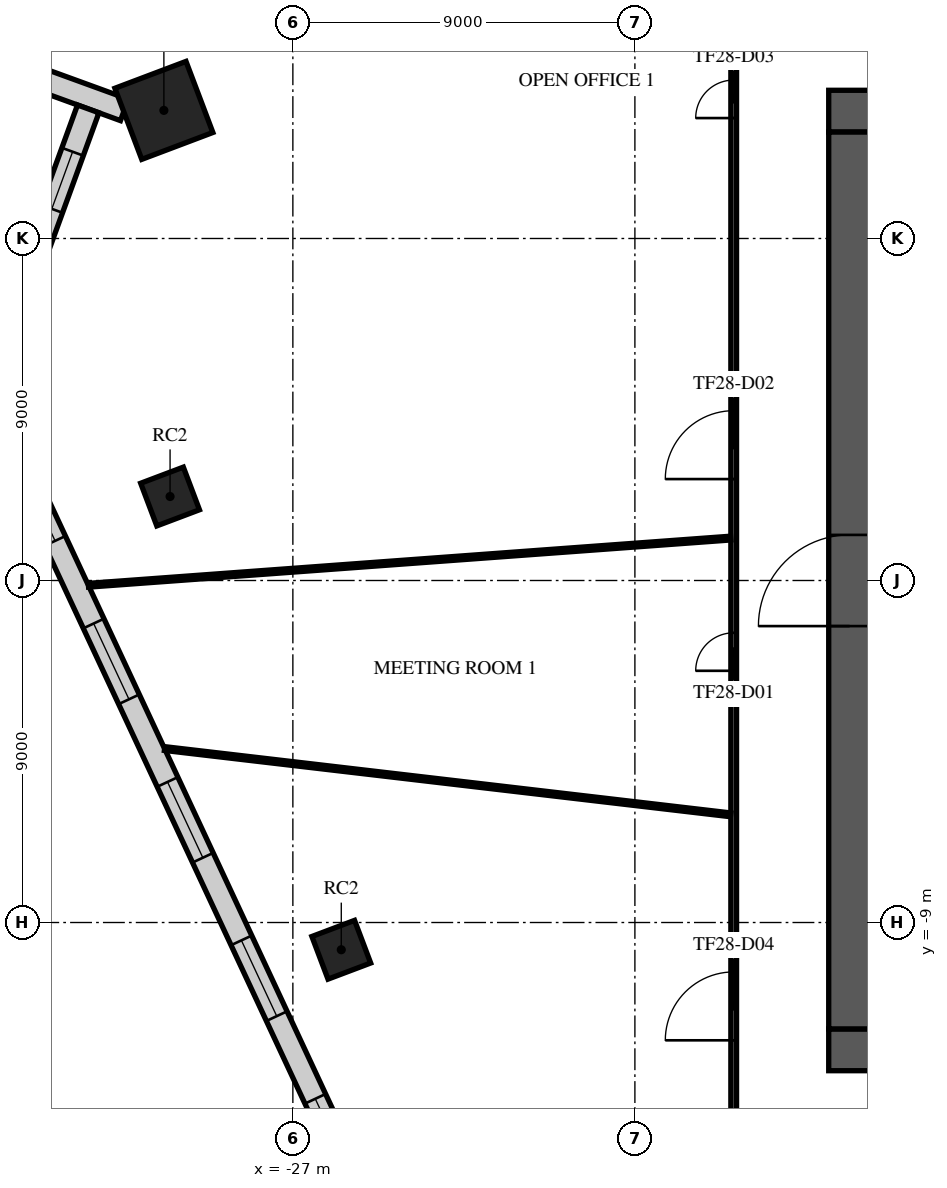
"""IFC4 building model, lengths in metres.
Left out: names, types, materials, properties, quantities, classifications, styles, units other than length and angle.
Written with IfcOpenShell. Run it as: python <this file> out.ifc"""

import sys

from ifc_helpers import new_model, si_unit, direction, frame, frame_2d, origin, origin_2d, place, context, subcontext, project, spatial, rectangle, extrude, element, fill, save


model = new_model("IFC4")
c1 = context("Model", 3, precision=1e-05, world=origin(), true_north=direction((0.0, 1.0)))
c2 = subcontext(c1, "Body", "Model", "MODEL_VIEW")
j1 = project(units=[si_unit("LENGTHUNIT", "METRE"), si_unit("PLANEANGLEUNIT", "RADIAN")], contexts=[c1])
p1 = place(None, origin())
s1 = spatial("IfcSite", under=j1, at=p1, CompositionType="ELEMENT")
p2 = place(p1, origin())
s2 = spatial("IfcBuilding", under=s1, at=p2, CompositionType="ELEMENT")
p3 = place(p2, frame((0.0, 0.0, 122.1)))
s3 = spatial("IfcBuildingStorey", under=s2, at=p3, CompositionType="ELEMENT", Elevation=122.1)
p4 = place(p3, frame((-30.394, 12.371, 0.0), z_axis=(0.0, 0.0, 1.0), x_axis=(0.935491525991, 0.353349125935, 0.0)))
e1 = element("IfcColumn", 1, at=p4, inside=s3, PredefinedType="COLUMN", context=c2, shape_type="SweptSolid", body=[
    extrude(rectangle(XDim=2.0, YDim=2.0, at=origin_2d()), origin(), (0.0, 0.0, 1.0), 4.0),
])
for number, where, z_axis, x_axis in (
    (2, (-30.231, 2.21, 0.0), (0.0, 0.0, 1.0), (0.935, 0.353, 0.0)),
    (3, (-25.726, -9.717, 0.0), (0.0, 0.0, 1.0), (0.935, 0.353, 0.0)),
):
    element("IfcColumn", number, at=place(p3, frame(where, z_axis=z_axis, x_axis=x_axis)), inside=s3, PredefinedType="COLUMN", context=c2, shape_type="SweptSolid", body=[
        extrude(rectangle(XDim=1.2, YDim=1.2, at=origin_2d()), origin(), (0.0, 0.0, 1.0), 4.0),
    ])
p5 = place(p3, frame((-12.9, 12.35, 0.0), z_axis=(0.0, 0.0, 1.0), x_axis=(1.0, 0.0, 0.0)))
e4 = element("IfcWall", 4, at=p5, inside=s3, PredefinedType="SHEAR", context=c2, shape_type="SweptSolid", body=[
    extrude(rectangle(XDim=25.8, YDim=1.1, at=frame_2d((12.9, 0.0))), origin(), (0.0, 0.0, 1.0), 3.58),
])
p6 = place(p5, frame((11.7, 0.0, 0.0)))
e5 = element("IfcOpeningElement", 5, at=p6, cuts=e4, PredefinedType="OPENING", context=c2, shape_type="SweptSolid", body=[
    extrude(rectangle(XDim=2.4, YDim=2.4, at=frame_2d((1.2, 1.2))), frame((0.0, 0.56, 0.0), z_axis=(0.0, -1.0, 0.0), x_axis=(1.0, 0.0, 0.0)), (0.0, 0.0, 1.0), 1.12),
])
p7 = place(p5, frame((22.525, 0.0, 0.0)))
e6 = element("IfcOpeningElement", 6, at=p7, cuts=e4, PredefinedType="OPENING", context=c2, shape_type="SweptSolid", body=[
    extrude(rectangle(XDim=1.2, YDim=2.1, at=frame_2d((0.6, 1.05))), frame((0.0, 0.56, 0.0), z_axis=(0.0, -1.0, 0.0), x_axis=(1.0, 0.0, 0.0)), (0.0, 0.0, 1.0), 1.12),
])
p8 = place(p5, frame((1.5, 0.0, 0.0)))
e7 = element("IfcOpeningElement", 7, at=p8, cuts=e4, PredefinedType="OPENING", context=c2, shape_type="SweptSolid", body=[
    extrude(rectangle(XDim=1.0, YDim=2.1, at=frame_2d((0.5, 1.05))), frame((0.0, 0.56, 0.0), z_axis=(0.0, -1.0, 0.0), x_axis=(1.0, 0.0, 0.0)), (0.0, 0.0, 1.0), 1.12),
])
p9 = place(p3, frame((-12.9, -12.35, 0.0), z_axis=(0.0, 0.0, 1.0), x_axis=(1.0, 0.0, 0.0)))
e8 = element("IfcWall", 8, at=p9, inside=s3, PredefinedType="SHEAR", context=c2, shape_type="SweptSolid", body=[
    extrude(rectangle(XDim=25.8, YDim=1.1, at=frame_2d((12.9, 0.0))), origin(), (0.0, 0.0, 1.0), 3.58),
])
p10 = place(p9, frame((7.8, 0.0, 0.0)))
e9 = element("IfcOpeningElement", 9, at=p10, cuts=e8, PredefinedType="OPENING", context=c2, shape_type="SweptSolid", body=[
    extrude(rectangle(XDim=2.0, YDim=2.1, at=frame_2d((1.0, 1.05))), frame((0.0, 0.56, 0.0), z_axis=(0.0, -1.0, 0.0), x_axis=(1.0, 0.0, 0.0)), (0.0, 0.0, 1.0), 1.12),
])
p11 = place(p9, frame((17.925, 0.0, 0.0)))
e10 = element("IfcOpeningElement", 10, at=p11, cuts=e8, PredefinedType="OPENING", context=c2, shape_type="SweptSolid", body=[
    extrude(rectangle(XDim=1.2, YDim=2.1, at=frame_2d((0.6, 1.05))), frame((0.0, 0.56, 0.0), z_axis=(0.0, -1.0, 0.0), x_axis=(1.0, 0.0, 0.0)), (0.0, 0.0, 1.0), 1.12),
])
p12 = place(p9, frame((2.075, 0.0, 0.0)))
e11 = element("IfcOpeningElement", 11, at=p12, cuts=e8, PredefinedType="OPENING", context=c2, shape_type="SweptSolid", body=[
    extrude(rectangle(XDim=1.2, YDim=2.1, at=frame_2d((0.6, 1.05))), frame((0.0, 0.56, 0.0), z_axis=(0.0, -1.0, 0.0), x_axis=(1.0, 0.0, 0.0)), (0.0, 0.0, 1.0), 1.12),
])
p13 = place(p9, frame((22.525, 0.0, 0.0)))
e12 = element("IfcOpeningElement", 12, at=p13, cuts=e8, PredefinedType="OPENING", context=c2, shape_type="SweptSolid", body=[
    extrude(rectangle(XDim=1.2, YDim=2.1, at=frame_2d((0.6, 1.05))), frame((0.0, 0.56, 0.0), z_axis=(0.0, -1.0, 0.0), x_axis=(1.0, 0.0, 0.0)), (0.0, 0.0, 1.0), 1.12),
])
p14 = place(p3, frame((-12.35, -11.8, 0.0), z_axis=(0.0, 0.0, 1.0), x_axis=(0.0, 1.0, 0.0)))
e13 = element("IfcWall", 13, at=p14, inside=s3, PredefinedType="SHEAR", context=c2, shape_type="SweptSolid", body=[
    extrude(rectangle(XDim=23.6, YDim=1.1, at=frame_2d((11.8, 0.0))), origin(), (0.0, 0.0, 1.0), 3.58),
])
p15 = place(p14, frame((10.6, 0.0, 0.0)))
e14 = element("IfcOpeningElement", 14, at=p15, cuts=e13, PredefinedType="OPENING", context=c2, shape_type="SweptSolid", body=[
    extrude(rectangle(XDim=2.4, YDim=2.4, at=frame_2d((1.2, 1.2))), frame((0.0, 0.56, 0.0), z_axis=(0.0, -1.0, 0.0), x_axis=(1.0, 0.0, 0.0)), (0.0, 0.0, 1.0), 1.12),
])
p16 = place(p3, frame((-34.35, 13.445, 0.0), z_axis=(0.0, 0.0, 1.0), x_axis=(0.939708408288, -0.341976764406, 0.0)))
e15 = element("IfcWall", 15, at=p16, inside=s3, PredefinedType="STANDARD", context=c2, shape_type="SweptSolid", body=[
    extrude(rectangle(XDim=3.103, YDim=0.6, at=frame_2d((1.552, 0.0))), origin(), (0.0, 0.0, 1.0), 3.58),
])
p17 = place(p3, frame((-32.385, 12.411, 0.0), z_axis=(0.0, 0.0, 1.0), x_axis=(-0.342037080957, -0.939686455819, 0.0)))
e16 = element("IfcWall", 16, at=p17, inside=s3, PredefinedType="STANDARD", context=c2, shape_type="SweptSolid", body=[
    extrude(rectangle(XDim=4.0, YDim=0.6, at=frame_2d((2.0, 0.0))), origin(), (0.0, 0.0, 1.0), 3.58),
])
p18 = place(p17, frame((1.2, 0.0, 0.9)))
e17 = element("IfcOpeningElement", 17, at=p18, cuts=e16, PredefinedType="OPENING", context=c2, shape_type="SweptSolid", body=[
    extrude(rectangle(XDim=1.6, YDim=2.1, at=frame_2d((0.8, 1.05))), frame((0.0, 0.31, 0.0), z_axis=(0.0, -1.0, 0.0), x_axis=(1.0, 0.0, 0.0)), (0.0, 0.0, 1.0), 0.62),
])
p19 = place(p3, frame((-36.585, 8.181, 0.0), z_axis=(0.0, 0.0, 1.0), x_axis=(0.422619608855, -0.906307158866, 0.0)))
e18 = element("IfcWall", 18, at=p19, inside=s3, PredefinedType="STANDARD", context=c2, shape_type="SweptSolid", body=[
    extrude(rectangle(XDim=45.751, YDim=0.6, at=frame_2d((22.876, 0.0))), origin(), (0.0, 0.0, 1.0), 3.58),
])
p20 = place(p19, frame((1.138, 0.0, 0.9)))
e19 = element("IfcOpeningElement", 19, at=p20, cuts=e18, PredefinedType="OPENING", context=c2, shape_type="SweptSolid", body=[
    extrude(rectangle(XDim=2.2, YDim=2.1, at=frame_2d((1.1, 1.05))), frame((0.0, 0.31, 0.0), z_axis=(0.0, -1.0, 0.0), x_axis=(1.0, 0.0, 0.0)), (0.0, 0.0, 1.0), 0.62),
])
p21 = place(p19, frame((5.676, 0.0, 0.9)))
e20 = element("IfcOpeningElement", 20, at=p21, cuts=e18, PredefinedType="OPENING", context=c2, shape_type="SweptSolid", body=[
    extrude(rectangle(XDim=2.2, YDim=2.1, at=frame_2d((1.1, 1.05))), frame((0.0, 0.31, 0.0), z_axis=(0.0, -1.0, 0.0), x_axis=(1.0, 0.0, 0.0)), (0.0, 0.0, 1.0), 0.62),
])
p22 = place(p19, frame((10.276, 0.0, 0.9)))
e21 = element("IfcOpeningElement", 21, at=p22, cuts=e18, PredefinedType="OPENING", context=c2, shape_type="SweptSolid", body=[
    extrude(rectangle(XDim=2.2, YDim=2.1, at=frame_2d((1.1, 1.05))), frame((0.0, 0.31, 0.0), z_axis=(0.0, -1.0, 0.0), x_axis=(1.0, 0.0, 0.0)), (0.0, 0.0, 1.0), 0.62),
])
p23 = place(p19, frame((14.876, 0.0, 0.9)))
e22 = element("IfcOpeningElement", 22, at=p23, cuts=e18, PredefinedType="OPENING", context=c2, shape_type="SweptSolid", body=[
    extrude(rectangle(XDim=2.2, YDim=2.1, at=frame_2d((1.1, 1.05))), frame((0.0, 0.31, 0.0), z_axis=(0.0, -1.0, 0.0), x_axis=(1.0, 0.0, 0.0)), (0.0, 0.0, 1.0), 0.62),
])
p24 = place(p19, frame((19.476, 0.0, 0.9)))
e23 = element("IfcOpeningElement", 23, at=p24, cuts=e18, PredefinedType="OPENING", context=c2, shape_type="SweptSolid", body=[
    extrude(rectangle(XDim=2.2, YDim=2.1, at=frame_2d((1.1, 1.05))), frame((0.0, 0.31, 0.0), z_axis=(0.0, -1.0, 0.0), x_axis=(1.0, 0.0, 0.0)), (0.0, 0.0, 1.0), 0.62),
])
p25 = place(p19, frame((24.076, 0.0, 0.9)))
e24 = element("IfcOpeningElement", 24, at=p25, cuts=e18, PredefinedType="OPENING", context=c2, shape_type="SweptSolid", body=[
    extrude(rectangle(XDim=2.2, YDim=2.1, at=frame_2d((1.1, 1.05))), frame((0.0, 0.31, 0.0), z_axis=(0.0, -1.0, 0.0), x_axis=(1.0, 0.0, 0.0)), (0.0, 0.0, 1.0), 0.62),
])
p26 = place(p19, frame((28.676, 0.0, 0.9)))
e25 = element("IfcOpeningElement", 25, at=p26, cuts=e18, PredefinedType="OPENING", context=c2, shape_type="SweptSolid", body=[
    extrude(rectangle(XDim=2.2, YDim=2.1, at=frame_2d((1.1, 1.05))), frame((0.0, 0.31, 0.0), z_axis=(0.0, -1.0, 0.0), x_axis=(1.0, 0.0, 0.0)), (0.0, 0.0, 1.0), 0.62),
])
p27 = place(p19, frame((37.876, 0.0, 0.9)))
e26 = element("IfcOpeningElement", 26, at=p27, cuts=e18, PredefinedType="OPENING", context=c2, shape_type="SweptSolid", body=[
    extrude(rectangle(XDim=2.2, YDim=2.1, at=frame_2d((1.1, 1.05))), frame((0.0, 0.31, 0.0), z_axis=(0.0, -1.0, 0.0), x_axis=(1.0, 0.0, 0.0)), (0.0, 0.0, 1.0), 0.62),
])
p28 = place(p19, frame((42.414, 0.0, 0.9)))
e27 = element("IfcOpeningElement", 27, at=p28, cuts=e18, PredefinedType="OPENING", context=c2, shape_type="SweptSolid", body=[
    extrude(rectangle(XDim=2.2, YDim=2.1, at=frame_2d((1.1, 1.05))), frame((0.0, 0.31, 0.0), z_axis=(0.0, -1.0, 0.0), x_axis=(1.0, 0.0, 0.0)), (0.0, 0.0, 1.0), 0.62),
])
p29 = place(p3, frame((-15.4, -15.4, 0.0), z_axis=(0.0, 0.0, 1.0), x_axis=(0.0, 1.0, 0.0)))
e28 = element("IfcWall", 28, at=p29, inside=s3, PredefinedType="PARTITIONING", context=c2, shape_type="SweptSolid", body=[
    extrude(rectangle(XDim=30.8, YDim=0.15, at=frame_2d((15.4, 0.0))), origin(), (0.0, 0.0, 1.0), 3.08),
])
p30 = place(p29, frame((13.024, 0.0, 0.0)))
e29 = element("IfcOpeningElement", 29, at=p30, cuts=e28, PredefinedType="OPENING", context=c2, shape_type="SweptSolid", body=[
    extrude(rectangle(XDim=1.0, YDim=2.1, at=frame_2d((0.5, 1.05))), frame((0.0, 0.085, 0.0), z_axis=(0.0, -1.0, 0.0), x_axis=(1.0, 0.0, 0.0)), (0.0, 0.0, 1.0), 0.17),
])
p31 = place(p29, frame((18.069, 0.0, 0.0)))
e30 = element("IfcOpeningElement", 30, at=p31, cuts=e28, PredefinedType="OPENING", context=c2, shape_type="SweptSolid", body=[
    extrude(rectangle(XDim=1.8, YDim=2.1, at=frame_2d((0.9, 1.05))), frame((0.0, 0.085, 0.0), z_axis=(0.0, -1.0, 0.0), x_axis=(1.0, 0.0, 0.0)), (0.0, 0.0, 1.0), 0.17),
])
p32 = place(p29, frame((27.569, 0.0, 0.0)))
e31 = element("IfcOpeningElement", 31, at=p32, cuts=e28, PredefinedType="OPENING", context=c2, shape_type="SweptSolid", body=[
    extrude(rectangle(XDim=1.0, YDim=2.1, at=frame_2d((0.5, 1.05))), frame((0.0, 0.085, 0.0), z_axis=(0.0, -1.0, 0.0), x_axis=(1.0, 0.0, 0.0)), (0.0, 0.0, 1.0), 0.17),
])
p33 = place(p29, frame((3.3, 0.0, 0.0)))
e32 = element("IfcOpeningElement", 32, at=p33, cuts=e28, PredefinedType="OPENING", context=c2, shape_type="SweptSolid", body=[
    extrude(rectangle(XDim=1.8, YDim=2.1, at=frame_2d((0.9, 1.05))), frame((0.0, 0.085, 0.0), z_axis=(0.0, -1.0, 0.0), x_axis=(1.0, 0.0, 0.0)), (0.0, 0.0, 1.0), 0.17),
])
p34 = place(p3, frame((-32.379, -0.125, 0.0), z_axis=(0.0, 0.0, 1.0), x_axis=(0.997314918509, 0.073232187723, 0.0)))
e33 = element("IfcWall", 33, at=p34, inside=s3, PredefinedType="PARTITIONING", context=c2, shape_type="SweptSolid", body=[
    extrude(rectangle(XDim=16.946, YDim=0.1, at=frame_2d((8.473, 0.0))), origin(), (0.0, 0.0, 1.0), 2.83),
])
p35 = place(p3, frame((-30.375, -4.422, 0.0), z_axis=(0.0, 0.0, 1.0), x_axis=(0.993213359121, -0.116306591663, 0.0)))
e34 = element("IfcWall", 34, at=p35, inside=s3, PredefinedType="PARTITIONING", context=c2, shape_type="SweptSolid", body=[
    extrude(rectangle(XDim=14.996, YDim=0.1, at=frame_2d((7.498, 0.0))), origin(), (0.0, 0.0, 1.0), 2.83),
])
p36 = place(p15, origin())
e35 = element("IfcDoor", 35, at=p36, inside=s3, OperationType="SINGLE_SWING_LEFT", PredefinedType="DOOR", context=c2, shape_type="SweptSolid", body=[
    extrude(rectangle(XDim=2.4, YDim=2.4, at=frame_2d((1.2, 1.2))), frame((0.0, 0.025, 0.0), z_axis=(0.0, -1.0, 0.0), x_axis=(1.0, 0.0, 0.0)), (0.0, 0.0, 1.0), 0.05),
])
fill(e14, e35)
p37 = place(p18, origin())
e36 = element("IfcWindow", 36, at=p37, inside=s3, PartitioningType="SINGLE_PANEL", PredefinedType="WINDOW", context=c2, shape_type="SweptSolid", body=[
    extrude(rectangle(XDim=1.6, YDim=2.1, at=frame_2d((0.8, 1.05))), frame((0.0, 0.03, 0.0), z_axis=(0.0, -1.0, 0.0), x_axis=(1.0, 0.0, 0.0)), (0.0, 0.0, 1.0), 0.06),
])
fill(e17, e36)
p38 = place(p21, origin())
e37 = element("IfcWindow", 37, at=p38, inside=s3, PartitioningType="SINGLE_PANEL", PredefinedType="WINDOW", context=c2, shape_type="SweptSolid", body=[
    extrude(rectangle(XDim=2.2, YDim=2.1, at=frame_2d((1.1, 1.05))), frame((0.0, 0.03, 0.0), z_axis=(0.0, -1.0, 0.0), x_axis=(1.0, 0.0, 0.0)), (0.0, 0.0, 1.0), 0.06),
])
fill(e20, e37)
p39 = place(p22, origin())
e38 = element("IfcWindow", 38, at=p39, inside=s3, PartitioningType="SINGLE_PANEL", PredefinedType="WINDOW", context=c2, shape_type="SweptSolid", body=[
    extrude(rectangle(XDim=2.2, YDim=2.1, at=frame_2d((1.1, 1.05))), frame((0.0, 0.03, 0.0), z_axis=(0.0, -1.0, 0.0), x_axis=(1.0, 0.0, 0.0)), (0.0, 0.0, 1.0), 0.06),
])
fill(e21, e38)
p40 = place(p23, origin())
e39 = element("IfcWindow", 39, at=p40, inside=s3, PartitioningType="SINGLE_PANEL", PredefinedType="WINDOW", context=c2, shape_type="SweptSolid", body=[
    extrude(rectangle(XDim=2.2, YDim=2.1, at=frame_2d((1.1, 1.05))), frame((0.0, 0.03, 0.0), z_axis=(0.0, -1.0, 0.0), x_axis=(1.0, 0.0, 0.0)), (0.0, 0.0, 1.0), 0.06),
])
fill(e22, e39)
p41 = place(p24, origin())
e40 = element("IfcWindow", 40, at=p41, inside=s3, PartitioningType="SINGLE_PANEL", PredefinedType="WINDOW", context=c2, shape_type="SweptSolid", body=[
    extrude(rectangle(XDim=2.2, YDim=2.1, at=frame_2d((1.1, 1.05))), frame((0.0, 0.03, 0.0), z_axis=(0.0, -1.0, 0.0), x_axis=(1.0, 0.0, 0.0)), (0.0, 0.0, 1.0), 0.06),
])
fill(e23, e40)
p42 = place(p25, origin())
e41 = element("IfcWindow", 41, at=p42, inside=s3, PartitioningType="SINGLE_PANEL", PredefinedType="WINDOW", context=c2, shape_type="SweptSolid", body=[
    extrude(rectangle(XDim=2.2, YDim=2.1, at=frame_2d((1.1, 1.05))), frame((0.0, 0.03, 0.0), z_axis=(0.0, -1.0, 0.0), x_axis=(1.0, 0.0, 0.0)), (0.0, 0.0, 1.0), 0.06),
])
fill(e24, e41)
p43 = place(p30, origin())
e42 = element("IfcDoor", 42, at=p43, inside=s3, OperationType="SINGLE_SWING_RIGHT", PredefinedType="DOOR", context=c2, shape_type="SweptSolid", body=[
    extrude(rectangle(XDim=1.0, YDim=2.1, at=frame_2d((0.5, 1.05))), frame((0.0, 0.025, 0.0), z_axis=(0.0, -1.0, 0.0), x_axis=(1.0, 0.0, 0.0)), (0.0, 0.0, 1.0), 0.05),
])
fill(e29, e42)
p44 = place(p31, origin())
e43 = element("IfcDoor", 43, at=p44, inside=s3, OperationType="DOUBLE_DOOR_SINGLE_SWING", PredefinedType="DOOR", context=c2, shape_type="SweptSolid", body=[
    extrude(rectangle(XDim=1.8, YDim=2.1, at=frame_2d((0.9, 1.05))), frame((0.0, 0.025, 0.0), z_axis=(0.0, -1.0, 0.0), x_axis=(1.0, 0.0, 0.0)), (0.0, 0.0, 1.0), 0.05),
])
fill(e30, e43)
p45 = place(p32, origin())
e44 = element("IfcDoor", 44, at=p45, inside=s3, OperationType="SINGLE_SWING_LEFT", PredefinedType="DOOR", context=c2, shape_type="SweptSolid", body=[
    extrude(rectangle(XDim=1.0, YDim=2.1, at=frame_2d((0.5, 1.05))), frame((0.0, 0.025, 0.0), z_axis=(0.0, -1.0, 0.0), x_axis=(1.0, 0.0, 0.0)), (0.0, 0.0, 1.0), 0.05),
])
fill(e31, e44)
p46 = place(p33, origin())
e45 = element("IfcDoor", 45, at=p46, inside=s3, OperationType="DOUBLE_DOOR_SINGLE_SWING", PredefinedType="DOOR", context=c2, shape_type="SweptSolid", body=[
    extrude(rectangle(XDim=1.8, YDim=2.1, at=frame_2d((0.9, 1.05))), frame((0.0, 0.025, 0.0), z_axis=(0.0, -1.0, 0.0), x_axis=(1.0, 0.0, 0.0)), (0.0, 0.0, 1.0), 0.05),
])
fill(e32, e45)
save(model, sys.argv[1])
